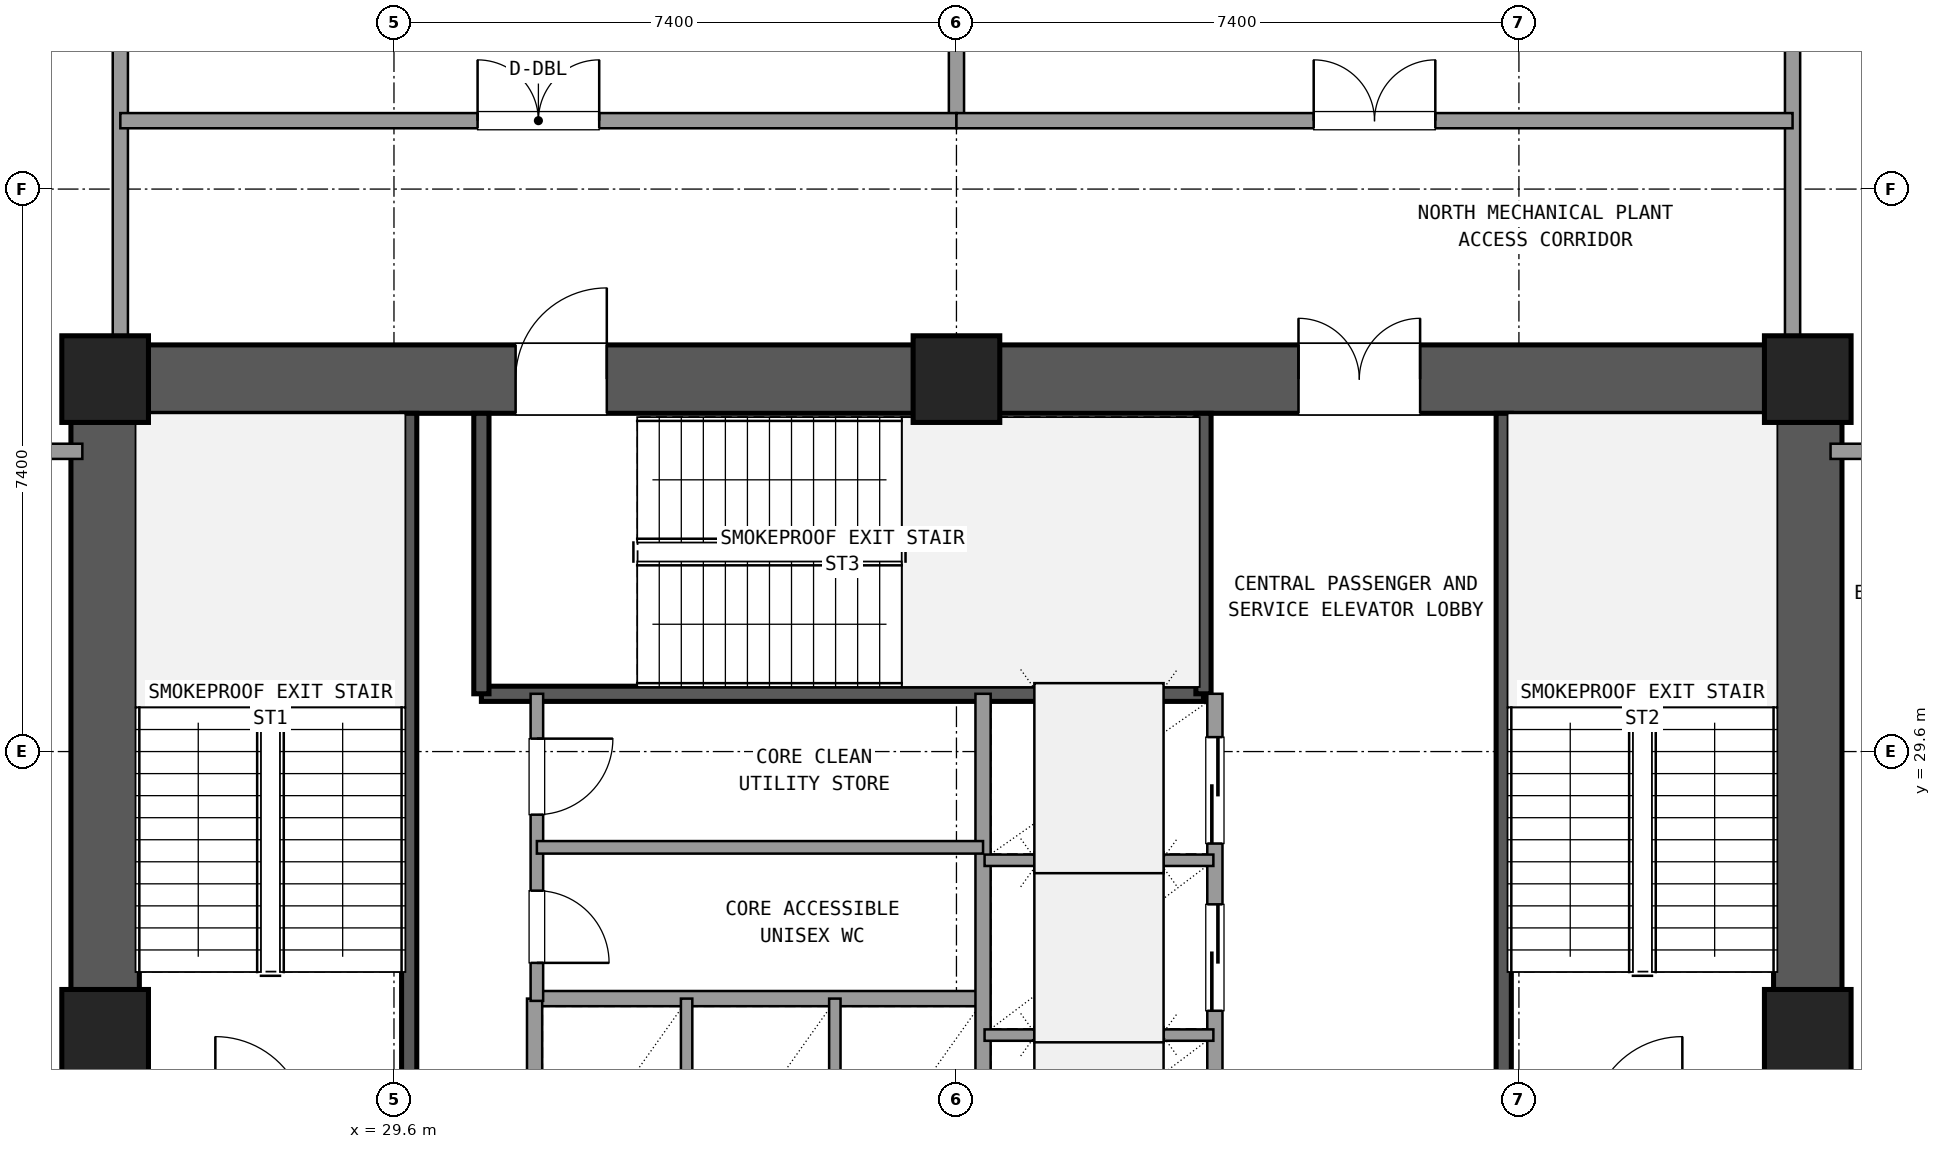
"""IFC4 building model, lengths in metres.
Left out: names, types, materials, properties, quantities, classifications, styles, units other than length and angle.
Written with IfcOpenShell. Run it as: python <this file> out.ifc"""

import sys

from ifc_helpers import new_model, si_unit, direction, frame, frame_2d, origin, origin_2d, place, context, subcontext, project, spatial, rectangle, extrude, element, fill, save


model = new_model("IFC4")
c1 = context("Model", 3, precision=1e-05, world=origin(), true_north=direction((0.0, 1.0)))
c2 = subcontext(c1, "Body", "Model", "MODEL_VIEW")
j1 = project(units=[si_unit("LENGTHUNIT", "METRE"), si_unit("PLANEANGLEUNIT", "RADIAN")], contexts=[c1])
p1 = place(None, origin())
s1 = spatial("IfcSite", under=j1, at=p1, CompositionType="ELEMENT")
p2 = place(p1, origin())
s2 = spatial("IfcBuilding", under=s1, at=p2, CompositionType="ELEMENT")
p3 = place(p2, frame((0.0, 0.0, 70.74)))
s3 = spatial("IfcBuildingStorey", under=s2, at=p3, CompositionType="ELEMENT", Elevation=70.74)
for number, where, z_axis, x_axis in (
    (1, (48.2, 25.9, 0.0), (0.0, 0.0, 1.0), (1.0, 0.0, 0.0)),
    (2, (48.2, 34.5, 0.0), (0.0, 0.0, 1.0), (1.0, 0.0, 0.0)),
    (3, (37.0, 34.5, 0.0), (0.0, 0.0, 1.0), (1.0, 0.0, 0.0)),
    (4, (25.8, 34.5, 0.0), (0.0, 0.0, 1.0), (1.0, 0.0, 0.0)),
    (5, (25.8, 25.9, 0.0), (0.0, 0.0, 1.0), (1.0, 0.0, 0.0)),
):
    element("IfcColumn", number, at=place(p3, frame(where, z_axis=z_axis, x_axis=x_axis)), inside=s3, PredefinedType="COLUMN", context=c2, shape_type="SweptSolid", body=[
        extrude(rectangle(XDim=1.14, YDim=1.14, at=origin_2d()), origin(), (0.0, 0.0, 1.0), 4.68),
    ])
p4 = place(p3, frame((48.2, 26.465, 0.0), z_axis=(0.0, 0.0, 1.0), x_axis=(0.0, 1.0, 0.0)))
e6 = element("IfcWall", 6, at=p4, inside=s3, PredefinedType="SHEAR", context=c2, shape_type="SweptSolid", body=[
    extrude(rectangle(XDim=7.47, YDim=0.9, at=frame_2d((3.735, 0.0))), origin(), (0.0, 0.0, 1.0), 4.38),
])
p5 = place(p3, frame((47.635, 34.5, 0.0), z_axis=(0.0, 0.0, 1.0), x_axis=(-1.0, 0.0, 0.0)))
e7 = element("IfcWall", 7, at=p5, inside=s3, PredefinedType="SHEAR", context=c2, shape_type="SweptSolid", body=[
    extrude(rectangle(XDim=10.07, YDim=0.9, at=frame_2d((5.035, 0.0))), origin(), (0.0, 0.0, 1.0), 4.38),
])
p6 = place(p5, frame((4.535, 0.0, 0.0)))
e8 = element("IfcOpeningElement", 8, at=p6, cuts=e7, PredefinedType="OPENING", context=c2, shape_type="SweptSolid", body=[
    extrude(rectangle(XDim=1.6, YDim=2.2, at=frame_2d((0.8, 1.1))), frame((0.0, 0.46, 0.0), z_axis=(0.0, -1.0, 0.0), x_axis=(1.0, 0.0, 0.0)), (0.0, 0.0, 1.0), 0.92),
])
p7 = place(p3, frame((36.435, 34.5, 0.0), z_axis=(0.0, 0.0, 1.0), x_axis=(-1.0, 0.0, 0.0)))
e9 = element("IfcWall", 9, at=p7, inside=s3, PredefinedType="SHEAR", context=c2, shape_type="SweptSolid", body=[
    extrude(rectangle(XDim=10.07, YDim=0.9, at=frame_2d((5.035, 0.0))), origin(), (0.0, 0.0, 1.0), 4.38),
])
p8 = place(p7, frame((4.035, 0.0, 0.0)))
e10 = element("IfcOpeningElement", 10, at=p8, cuts=e9, PredefinedType="OPENING", context=c2, shape_type="SweptSolid", body=[
    extrude(rectangle(XDim=1.2, YDim=2.15, at=frame_2d((0.6, 1.075))), frame((0.0, 0.46, 0.0), z_axis=(0.0, -1.0, 0.0), x_axis=(1.0, 0.0, 0.0)), (0.0, 0.0, 1.0), 0.92),
])
p9 = place(p3, frame((25.8, 33.935, 0.0), z_axis=(0.0, 0.0, 1.0), x_axis=(0.0, -1.0, 0.0)))
e11 = element("IfcWall", 11, at=p9, inside=s3, PredefinedType="SHEAR", context=c2, shape_type="SweptSolid", body=[
    extrude(rectangle(XDim=7.47, YDim=0.9, at=frame_2d((3.735, 0.0))), origin(), (0.0, 0.0, 1.0), 4.38),
])
for number, where, z_axis, x_axis in (
    (12, (29.8, 24.65, 0.0), (0.0, 0.0, 1.0), (0.0, 1.0, 0.0)),
    (13, (44.2, 24.65, 0.0), (0.0, 0.0, 1.0), (0.0, 1.0, 0.0)),
):
    element("IfcWall", number, at=place(p3, frame(where, z_axis=z_axis, x_axis=x_axis)), inside=s3, PredefinedType="SHEAR", context=c2, shape_type="SweptSolid", body=[
        extrude(rectangle(XDim=9.4, YDim=0.2, at=frame_2d((4.7, 0.0))), origin(), (0.0, 0.0, 1.0), 4.38),
    ])
p10 = place(p3, frame((30.75, 30.36, 0.0), z_axis=(0.0, 0.0, 1.0), x_axis=(1.0, 0.0, 0.0)))
e14 = element("IfcWall", 14, at=p10, inside=s3, PredefinedType="SHEAR", context=c2, shape_type="SweptSolid", body=[
    extrude(rectangle(XDim=9.5, YDim=0.2, at=frame_2d((4.75, 0.0))), origin(), (0.0, 0.0, 1.0), 4.38),
])
for number, where, z_axis, x_axis in (
    (15, (30.75, 30.36, 0.0), (0.0, 0.0, 1.0), (0.0, 1.0, 0.0)),
    (16, (40.25, 30.36, 0.0), (0.0, 0.0, 1.0), (0.0, 1.0, 0.0)),
):
    element("IfcWall", number, at=place(p3, frame(where, z_axis=z_axis, x_axis=x_axis)), inside=s3, PredefinedType="SHEAR", context=c2, shape_type="SweptSolid", body=[
        extrude(rectangle(XDim=3.69, YDim=0.2, at=frame_2d((1.845, 0.0))), origin(), (0.0, 0.0, 1.0), 4.38),
    ])
p11 = place(p3, frame((31.45, 26.35, 0.0), z_axis=(0.0, 0.0, 1.0), x_axis=(1.0, 0.0, 0.0)))
e17 = element("IfcWall", 17, at=p11, inside=s3, PredefinedType="SOLIDWALL", context=c2, shape_type="SweptSolid", body=[
    extrude(rectangle(XDim=5.9, YDim=0.2, at=frame_2d((2.95, 0.0))), origin(), (0.0, 0.0, 1.0), 2.75),
])
p12 = place(p3, frame((31.45, 23.54, 0.0), z_axis=(0.0, 0.0, 1.0), x_axis=(0.0, 1.0, 0.0)))
e18 = element("IfcWall", 18, at=p12, inside=s3, PredefinedType="SOLIDWALL", context=c2, shape_type="SweptSolid", body=[
    extrude(rectangle(XDim=2.81, YDim=0.2, at=frame_2d((1.405, 0.0))), origin(), (0.0, 0.0, 1.0), 2.75),
])
for number, where, z_axis, x_axis in (
    (19, (33.45, 23.54, 0.0), (0.0, 0.0, 1.0), (0.0, 1.0, 0.0)),
    (20, (35.4, 23.54, 0.0), (0.0, 0.0, 1.0), (0.0, 1.0, 0.0)),
):
    element("IfcWall", number, at=place(p3, frame(where, z_axis=z_axis, x_axis=x_axis)), inside=s3, PredefinedType="PARTITIONING", context=c2, shape_type="SweptSolid", body=[
        extrude(rectangle(XDim=2.81, YDim=0.15, at=frame_2d((1.405, 0.0))), origin(), (0.0, 0.0, 1.0), 2.75),
    ])
p13 = place(p3, frame((37.35, 23.54, 0.0), z_axis=(0.0, 0.0, 1.0), x_axis=(0.0, 1.0, 0.0)))
e21 = element("IfcWall", 21, at=p13, inside=s3, PredefinedType="SOLIDWALL", context=c2, shape_type="SweptSolid", body=[
    extrude(rectangle(XDim=6.82, YDim=0.2, at=frame_2d((3.41, 0.0))), origin(), (0.0, 0.0, 1.0), 2.75),
])
p14 = place(p3, frame((40.4, 23.54, 0.0), z_axis=(0.0, 0.0, 1.0), x_axis=(0.0, 1.0, 0.0)))
e22 = element("IfcWall", 22, at=p14, inside=s3, PredefinedType="SOLIDWALL", context=c2, shape_type="SweptSolid", body=[
    extrude(rectangle(XDim=6.82, YDim=0.2, at=frame_2d((3.41, 0.0))), origin(), (0.0, 0.0, 1.0), 2.75),
])
p15 = place(p14, frame((0.35, 0.0, 0.0)))
e23 = element("IfcOpeningElement", 23, at=p15, cuts=e22, PredefinedType="OPENING", context=c2, shape_type="SweptSolid", body=[
    extrude(rectangle(XDim=1.4, YDim=2.2, at=frame_2d((0.7, 1.1))), frame((0.0, 0.11, 0.0), z_axis=(0.0, -1.0, 0.0), x_axis=(1.0, 0.0, 0.0)), (0.0, 0.0, 1.0), 0.22),
])
p16 = place(p14, frame((2.65, 0.0, 0.0)))
e24 = element("IfcOpeningElement", 24, at=p16, cuts=e22, PredefinedType="OPENING", context=c2, shape_type="SweptSolid", body=[
    extrude(rectangle(XDim=1.4, YDim=2.2, at=frame_2d((0.7, 1.1))), frame((0.0, 0.11, 0.0), z_axis=(0.0, -1.0, 0.0), x_axis=(1.0, 0.0, 0.0)), (0.0, 0.0, 1.0), 0.22),
])
p17 = place(p14, frame((4.85, 0.0, 0.0)))
e25 = element("IfcOpeningElement", 25, at=p17, cuts=e22, PredefinedType="OPENING", context=c2, shape_type="SweptSolid", body=[
    extrude(rectangle(XDim=1.4, YDim=2.2, at=frame_2d((0.7, 1.1))), frame((0.0, 0.11, 0.0), z_axis=(0.0, -1.0, 0.0), x_axis=(1.0, 0.0, 0.0)), (0.0, 0.0, 1.0), 0.22),
])
for number, where, z_axis, x_axis in (
    (26, (37.37, 25.87, 0.0), (0.0, 0.0, 1.0), (1.0, 0.0, 0.0)),
    (27, (37.37, 28.17, 0.0), (0.0, 0.0, 1.0), (1.0, 0.0, 0.0)),
):
    element("IfcWall", number, at=place(p3, frame(where, z_axis=z_axis, x_axis=x_axis)), inside=s3, PredefinedType="PARTITIONING", context=c2, shape_type="SweptSolid", body=[
        extrude(rectangle(XDim=3.01, YDim=0.15, at=frame_2d((1.505, 0.0))), origin(), (0.0, 0.0, 1.0), 2.75),
    ])
p18 = place(p3, frame((31.48, 26.32, 0.0), z_axis=(0.0, 0.0, 1.0), x_axis=(0.0, 1.0, 0.0)))
e28 = element("IfcWall", 28, at=p18, inside=s3, PredefinedType="PLUMBINGWALL", context=c2, shape_type="SweptSolid", body=[
    extrude(rectangle(XDim=4.04, YDim=0.165, at=frame_2d((2.02, 0.0))), origin(), (0.0, 0.0, 1.0), 2.75),
])
p19 = place(p18, frame((0.5, 0.0, 0.0)))
e29 = element("IfcOpeningElement", 29, at=p19, cuts=e28, PredefinedType="OPENING", context=c2, shape_type="SweptSolid", body=[
    extrude(rectangle(XDim=0.95, YDim=2.1, at=frame_2d((0.475, 1.05))), frame((0.0, 0.093, 0.0), z_axis=(0.0, -1.0, 0.0), x_axis=(1.0, 0.0, 0.0)), (0.0, 0.0, 1.0), 0.185),
])
p20 = place(p18, frame((2.45, 0.0, 0.0)))
e30 = element("IfcOpeningElement", 30, at=p20, cuts=e28, PredefinedType="OPENING", context=c2, shape_type="SweptSolid", body=[
    extrude(rectangle(XDim=1.0, YDim=2.15, at=frame_2d((0.5, 1.075))), frame((0.0, 0.093, 0.0), z_axis=(0.0, -1.0, 0.0), x_axis=(1.0, 0.0, 0.0)), (0.0, 0.0, 1.0), 0.185),
])
p21 = place(p3, frame((31.48, 28.34, 0.0), z_axis=(0.0, 0.0, 1.0), x_axis=(1.0, 0.0, 0.0)))
e31 = element("IfcWall", 31, at=p21, inside=s3, PredefinedType="PLUMBINGWALL", context=c2, shape_type="SweptSolid", body=[
    extrude(rectangle(XDim=5.87, YDim=0.165, at=frame_2d((2.935, 0.0))), origin(), (0.0, 0.0, 1.0), 2.75),
])
for number, where, z_axis, x_axis in (
    (32, (26.0, 34.8, 0.0), (0.0, 0.0, 1.0), (0.0, 1.0, 0.0)),
    (33, (48.0, 34.8, 0.0), (0.0, 0.0, 1.0), (0.0, 1.0, 0.0)),
):
    element("IfcWall", number, at=place(p3, frame(where, z_axis=z_axis, x_axis=x_axis)), inside=s3, PredefinedType="SOLIDWALL", context=c2, shape_type="SweptSolid", body=[
        extrude(rectangle(XDim=10.4, YDim=0.2, at=frame_2d((5.2, 0.0))), origin(), (0.0, 0.0, 1.0), 2.75),
    ])
p22 = place(p3, frame((37.0, 37.9, 0.0), z_axis=(0.0, 0.0, 1.0), x_axis=(0.0, 1.0, 0.0)))
e34 = element("IfcWall", 34, at=p22, inside=s3, PredefinedType="SOLIDWALL", context=c2, shape_type="SweptSolid", body=[
    extrude(rectangle(XDim=7.3, YDim=0.2, at=frame_2d((3.65, 0.0))), origin(), (0.0, 0.0, 1.0), 2.75),
])
p23 = place(p3, frame((26.0, 37.9, 0.0), z_axis=(0.0, 0.0, 1.0), x_axis=(1.0, 0.0, 0.0)))
e35 = element("IfcWall", 35, at=p23, inside=s3, PredefinedType="SOLIDWALL", context=c2, shape_type="SweptSolid", body=[
    extrude(rectangle(XDim=11.0, YDim=0.2, at=frame_2d((5.5, 0.0))), origin(), (0.0, 0.0, 1.0), 2.75),
])
p24 = place(p23, frame((4.7, 0.0, 0.0)))
e36 = element("IfcOpeningElement", 36, at=p24, cuts=e35, PredefinedType="OPENING", context=c2, shape_type="SweptSolid", body=[
    extrude(rectangle(XDim=1.6, YDim=2.2, at=frame_2d((0.8, 1.1))), frame((0.0, 0.11, 0.0), z_axis=(0.0, -1.0, 0.0), x_axis=(1.0, 0.0, 0.0)), (0.0, 0.0, 1.0), 0.22),
])
p25 = place(p3, frame((37.0, 37.9, 0.0), z_axis=(0.0, 0.0, 1.0), x_axis=(1.0, 0.0, 0.0)))
e37 = element("IfcWall", 37, at=p25, inside=s3, PredefinedType="SOLIDWALL", context=c2, shape_type="SweptSolid", body=[
    extrude(rectangle(XDim=11.0, YDim=0.2, at=frame_2d((5.5, 0.0))), origin(), (0.0, 0.0, 1.0), 2.75),
])
p26 = place(p25, frame((4.7, 0.0, 0.0)))
e38 = element("IfcOpeningElement", 38, at=p26, cuts=e37, PredefinedType="OPENING", context=c2, shape_type="SweptSolid", body=[
    extrude(rectangle(XDim=1.6, YDim=2.2, at=frame_2d((0.8, 1.1))), frame((0.0, 0.11, 0.0), z_axis=(0.0, -1.0, 0.0), x_axis=(1.0, 0.0, 0.0)), (0.0, 0.0, 1.0), 0.22),
])
for number, where, z_axis, x_axis in (
    (39, (15.0, 33.55, 0.0), (0.0, 0.0, 1.0), (1.0, 0.0, 0.0)),
    (40, (48.5, 33.55, 0.0), (0.0, 0.0, 1.0), (1.0, 0.0, 0.0)),
):
    element("IfcWall", number, at=place(p3, frame(where, z_axis=z_axis, x_axis=x_axis)), inside=s3, PredefinedType="SOLIDWALL", context=c2, shape_type="SweptSolid", body=[
        extrude(rectangle(XDim=10.5, YDim=0.2, at=frame_2d((5.25, 0.0))), origin(), (0.0, 0.0, 1.0), 2.75),
    ])
p27 = place(p6, frame((1.6, 0.0, 0.0), z_axis=(0.0, 0.0, 1.0), x_axis=(-1.0, 0.0, 0.0)))
e41 = element("IfcDoor", 41, at=p27, inside=s3, OperationType="DOUBLE_DOOR_SINGLE_SWING", PredefinedType="DOOR", context=c2, shape_type="SweptSolid", body=[
    extrude(rectangle(XDim=1.6, YDim=2.2, at=frame_2d((0.8, 1.1))), frame((0.0, 0.025, 0.0), z_axis=(0.0, -1.0, 0.0), x_axis=(1.0, 0.0, 0.0)), (0.0, 0.0, 1.0), 0.05),
])
fill(e8, e41)
p28 = place(p8, frame((1.2, 0.0, 0.0), z_axis=(0.0, 0.0, 1.0), x_axis=(-1.0, 0.0, 0.0)))
e42 = element("IfcDoor", 42, at=p28, inside=s3, OperationType="SINGLE_SWING_LEFT", PredefinedType="DOOR", context=c2, shape_type="SweptSolid", body=[
    extrude(rectangle(XDim=1.2, YDim=2.15, at=frame_2d((0.6, 1.075))), frame((0.0, 0.025, 0.0), z_axis=(0.0, -1.0, 0.0), x_axis=(1.0, 0.0, 0.0)), (0.0, 0.0, 1.0), 0.05),
])
fill(e10, e42)
p29 = place(p16, origin())
e43 = element("IfcDoor", 43, at=p29, inside=s3, OperationType="SLIDING_TO_LEFT", PredefinedType="DOOR", context=c2, shape_type="SweptSolid", body=[
    extrude(rectangle(XDim=1.4, YDim=2.2, at=frame_2d((0.7, 1.1))), frame((0.0, 0.025, 0.0), z_axis=(0.0, -1.0, 0.0), x_axis=(1.0, 0.0, 0.0)), (0.0, 0.0, 1.0), 0.05),
])
fill(e24, e43)
p30 = place(p17, origin())
e44 = element("IfcDoor", 44, at=p30, inside=s3, OperationType="SLIDING_TO_RIGHT", PredefinedType="DOOR", context=c2, shape_type="SweptSolid", body=[
    extrude(rectangle(XDim=1.4, YDim=2.2, at=frame_2d((0.7, 1.1))), frame((0.0, 0.025, 0.0), z_axis=(0.0, -1.0, 0.0), x_axis=(1.0, 0.0, 0.0)), (0.0, 0.0, 1.0), 0.05),
])
fill(e25, e44)
p31 = place(p19, frame((0.95, 0.0, 0.0), z_axis=(0.0, 0.0, 1.0), x_axis=(-1.0, 0.0, 0.0)))
e45 = element("IfcDoor", 45, at=p31, inside=s3, OperationType="SINGLE_SWING_LEFT", PredefinedType="DOOR", context=c2, shape_type="SweptSolid", body=[
    extrude(rectangle(XDim=0.95, YDim=2.1, at=frame_2d((0.475, 1.05))), frame((0.0, 0.025, 0.0), z_axis=(0.0, -1.0, 0.0), x_axis=(1.0, 0.0, 0.0)), (0.0, 0.0, 1.0), 0.05),
])
fill(e29, e45)
p32 = place(p20, frame((1.0, 0.0, 0.0), z_axis=(0.0, 0.0, 1.0), x_axis=(-1.0, 0.0, 0.0)))
e46 = element("IfcDoor", 46, at=p32, inside=s3, OperationType="SINGLE_SWING_RIGHT", PredefinedType="DOOR", context=c2, shape_type="SweptSolid", body=[
    extrude(rectangle(XDim=1.0, YDim=2.15, at=frame_2d((0.5, 1.075))), frame((0.0, 0.025, 0.0), z_axis=(0.0, -1.0, 0.0), x_axis=(1.0, 0.0, 0.0)), (0.0, 0.0, 1.0), 0.05),
])
fill(e30, e46)
p33 = place(p24, origin())
e47 = element("IfcDoor", 47, at=p33, inside=s3, OperationType="DOUBLE_DOOR_SINGLE_SWING", PredefinedType="DOOR", context=c2, shape_type="SweptSolid", body=[
    extrude(rectangle(XDim=1.6, YDim=2.2, at=frame_2d((0.8, 1.1))), frame((0.0, 0.025, 0.0), z_axis=(0.0, -1.0, 0.0), x_axis=(1.0, 0.0, 0.0)), (0.0, 0.0, 1.0), 0.05),
])
fill(e36, e47)
p34 = place(p26, origin())
e48 = element("IfcDoor", 48, at=p34, inside=s3, OperationType="DOUBLE_DOOR_SINGLE_SWING", PredefinedType="DOOR", context=c2, shape_type="SweptSolid", body=[
    extrude(rectangle(XDim=1.6, YDim=2.2, at=frame_2d((0.8, 1.1))), frame((0.0, 0.025, 0.0), z_axis=(0.0, -1.0, 0.0), x_axis=(1.0, 0.0, 0.0)), (0.0, 0.0, 1.0), 0.05),
])
fill(e38, e48)
save(model, sys.argv[1])
